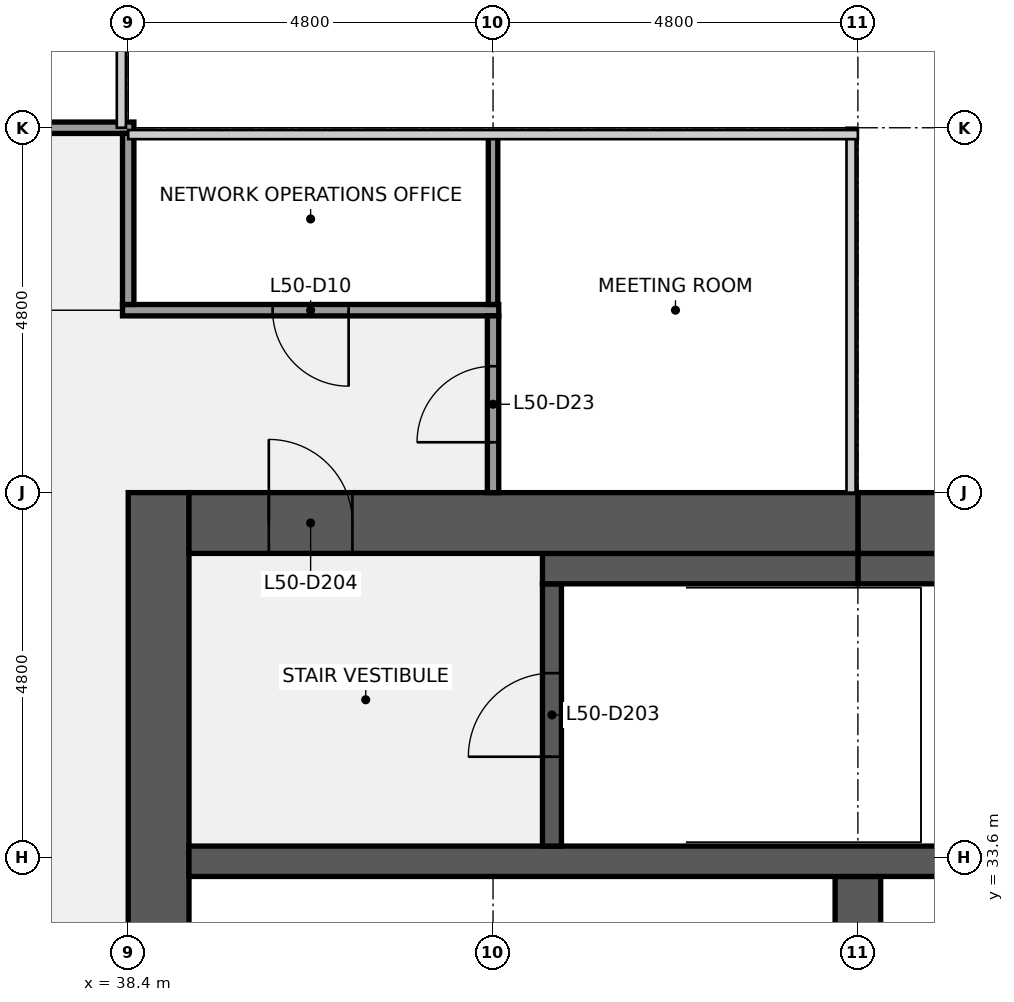
"""IFC4 building model, lengths in metres.
Left out: names, types, materials, properties, quantities, classifications, styles, units other than length and angle.
Written with IfcOpenShell. Run it as: python <this file> out.ifc"""

import sys

from ifc_helpers import new_model, si_unit, direction, frame, frame_2d, origin, place, context, subcontext, project, spatial, rectangle, extrude, element, fill, save


model = new_model("IFC4")
c1 = context("Model", 3, precision=1e-05, world=origin(), true_north=direction((0.0, 1.0)))
c2 = subcontext(c1, "Body", "Model", "MODEL_VIEW")
j1 = project(units=[si_unit("LENGTHUNIT", "METRE"), si_unit("PLANEANGLEUNIT", "RADIAN")], contexts=[c1])
p1 = place(None, origin())
s1 = spatial("IfcSite", under=j1, at=p1, CompositionType="ELEMENT")
p2 = place(p1, origin())
s2 = spatial("IfcBuilding", under=s1, at=p2, CompositionType="ELEMENT")
p3 = place(p2, frame((0.0, 0.0, 229.2)))
s3 = spatial("IfcBuildingStorey", under=s2, at=p3, CompositionType="ELEMENT", Elevation=229.2)
p4 = place(p3, frame((38.8, 9.6, 0.0), z_axis=(0.0, 0.0, 1.0), x_axis=(0.0, 1.0, 0.0)))
e1 = element("IfcWall", 1, at=p4, inside=s3, PredefinedType="SHEAR", context=c2, shape_type="SweptSolid", body=[
    extrude(rectangle(XDim=28.8, YDim=0.8, at=frame_2d((14.4, 0.0))), origin(), (0.0, 0.0, 1.0), 3.84),
])
p5 = place(p4, frame((8.7, 0.0, 0.0)))
e2 = element("IfcOpeningElement", 2, at=p5, cuts=e1, PredefinedType="OPENING", context=c2, shape_type="SweptSolid", body=[
    extrude(rectangle(XDim=1.8, YDim=2.1, at=frame_2d((0.9, 1.05))), frame((0.0, 0.41, 0.0), z_axis=(0.0, -1.0, 0.0), x_axis=(1.0, 0.0, 0.0)), (0.0, 0.0, 1.0), 0.82),
])
p6 = place(p4, frame((18.3, 0.0, 0.0)))
e3 = element("IfcOpeningElement", 3, at=p6, cuts=e1, PredefinedType="OPENING", context=c2, shape_type="SweptSolid", body=[
    extrude(rectangle(XDim=1.8, YDim=2.1, at=frame_2d((0.9, 1.05))), frame((0.0, 0.41, 0.0), z_axis=(0.0, -1.0, 0.0), x_axis=(1.0, 0.0, 0.0)), (0.0, 0.0, 1.0), 0.82),
])
p7 = place(p3, frame((48.0, 30.75, 0.0), z_axis=(0.0, 0.0, 1.0), x_axis=(0.0, 1.0, 0.0)))
e4 = element("IfcWall", 4, at=p7, inside=s3, PredefinedType="SHEAR", context=c2, shape_type="SweptSolid", body=[
    extrude(rectangle(XDim=2.6, YDim=0.6, at=frame_2d((1.3, 0.0))), origin(), (0.0, 0.0, 1.0), 3.84),
])
p8 = place(p3, frame((39.2, 33.55, 0.0), z_axis=(0.0, 0.0, 1.0), x_axis=(1.0, 0.0, 0.0)))
e5 = element("IfcWall", 5, at=p8, inside=s3, PredefinedType="SHEAR", context=c2, shape_type="SweptSolid", body=[
    extrude(rectangle(XDim=17.6, YDim=0.4, at=frame_2d((8.8, 0.0))), origin(), (0.0, 0.0, 1.0), 3.84),
])
p9 = place(p3, frame((43.975, 33.75, 0.0), z_axis=(0.0, 0.0, 1.0), x_axis=(0.0, 1.0, 0.0)))
e6 = element("IfcWall", 6, at=p9, inside=s3, PredefinedType="SHEAR", context=c2, shape_type="SweptSolid", body=[
    extrude(rectangle(XDim=3.45, YDim=0.25, at=frame_2d((1.725, 0.0))), origin(), (0.0, 0.0, 1.0), 3.84),
])
p10 = place(p9, frame((1.175, 0.0, 0.0)))
e7 = element("IfcOpeningElement", 7, at=p10, cuts=e6, PredefinedType="OPENING", context=c2, shape_type="SweptSolid", body=[
    extrude(rectangle(XDim=1.1, YDim=2.1, at=frame_2d((0.55, 1.05))), frame((0.0, 0.135, 0.0), z_axis=(0.0, -1.0, 0.0), x_axis=(1.0, 0.0, 0.0)), (0.0, 0.0, 1.0), 0.27),
])
p11 = place(p3, frame((48.0, 37.4, 0.0), z_axis=(0.0, 0.0, 1.0), x_axis=(1.0, 0.0, 0.0)))
e8 = element("IfcWall", 8, at=p11, inside=s3, PredefinedType="SHEAR", context=c2, shape_type="SweptSolid", body=[
    extrude(rectangle(XDim=3.35, YDim=0.4, at=frame_2d((1.675, 0.0))), origin(), (0.0, 0.0, 1.0), 3.84),
])
p12 = place(p3, frame((43.85, 37.4, 0.0), z_axis=(0.0, 0.0, 1.0), x_axis=(1.0, 0.0, 0.0)))
e9 = element("IfcWall", 9, at=p12, inside=s3, PredefinedType="SHEAR", context=c2, shape_type="SweptSolid", body=[
    extrude(rectangle(XDim=4.15, YDim=0.4, at=frame_2d((2.075, 0.0))), origin(), (0.0, 0.0, 1.0), 3.84),
])
p13 = place(p3, frame((48.0, 38.0, 0.0), z_axis=(0.0, 0.0, 1.0), x_axis=(1.0, 0.0, 0.0)))
e10 = element("IfcWall", 10, at=p13, inside=s3, PredefinedType="SHEAR", context=c2, shape_type="SweptSolid", body=[
    extrude(rectangle(XDim=8.8, YDim=0.8, at=frame_2d((4.4, 0.0))), origin(), (0.0, 0.0, 1.0), 3.84),
])
p14 = place(p13, frame((1.5, 0.0, 0.9)))
e11 = element("IfcOpeningElement", 11, at=p14, cuts=e10, PredefinedType="OPENING", context=c2, shape_type="SweptSolid", body=[
    extrude(rectangle(XDim=1.8, YDim=1.5, at=frame_2d((0.9, 0.75))), frame((0.0, 0.41, 0.0), z_axis=(0.0, -1.0, 0.0), x_axis=(1.0, 0.0, 0.0)), (0.0, 0.0, 1.0), 0.82),
])
p15 = place(p3, frame((39.2, 38.0, 0.0), z_axis=(0.0, 0.0, 1.0), x_axis=(1.0, 0.0, 0.0)))
e12 = element("IfcWall", 12, at=p15, inside=s3, PredefinedType="SHEAR", context=c2, shape_type="SweptSolid", body=[
    extrude(rectangle(XDim=8.8, YDim=0.8, at=frame_2d((4.4, 0.0))), origin(), (0.0, 0.0, 1.0), 3.84),
])
p16 = place(p15, frame((1.05, 0.0, 0.0)))
e13 = element("IfcOpeningElement", 13, at=p16, cuts=e12, PredefinedType="OPENING", context=c2, shape_type="SweptSolid", body=[
    extrude(rectangle(XDim=1.1, YDim=2.1, at=frame_2d((0.55, 1.05))), frame((0.0, 0.41, 0.0), z_axis=(0.0, -1.0, 0.0), x_axis=(1.0, 0.0, 0.0)), (0.0, 0.0, 1.0), 0.82),
])
p17 = place(p3, frame((38.325, 40.8, 0.0), z_axis=(0.0, 0.0, 1.0), x_axis=(1.0, 0.0, 0.0)))
e14 = element("IfcWall", 14, at=p17, inside=s3, PredefinedType="PARTITIONING", context=c2, shape_type="SweptSolid", body=[
    extrude(rectangle(XDim=4.95, YDim=0.15, at=frame_2d((2.475, 0.0))), origin(), (0.0, 0.0, 1.0), 2.849),
])
p18 = place(p17, frame((1.975, 0.0, 0.0)))
e15 = element("IfcOpeningElement", 15, at=p18, cuts=e14, PredefinedType="OPENING", context=c2, shape_type="SweptSolid", body=[
    extrude(rectangle(XDim=1.0, YDim=2.1, at=frame_2d((0.5, 1.05))), frame((0.0, 0.085, 0.0), z_axis=(0.0, -1.0, 0.0), x_axis=(1.0, 0.0, 0.0)), (0.0, 0.0, 1.0), 0.17),
])
p19 = place(p3, frame((19.125, 43.2, 0.0), z_axis=(0.0, 0.0, 1.0), x_axis=(1.0, 0.0, 0.0)))
e16 = element("IfcWall", 16, at=p19, inside=s3, PredefinedType="PARTITIONING", context=c2, shape_type="SweptSolid", body=[
    extrude(rectangle(XDim=19.35, YDim=0.15, at=frame_2d((9.675, 0.0))), origin(), (0.0, 0.0, 1.0), 2.849),
])
p20 = place(p19, frame((4.375, 0.0, 0.0)))
e17 = element("IfcOpeningElement", 17, at=p20, cuts=e16, PredefinedType="OPENING", context=c2, shape_type="SweptSolid", body=[
    extrude(rectangle(XDim=1.0, YDim=2.1, at=frame_2d((0.5, 1.05))), frame((0.0, 0.085, 0.0), z_axis=(0.0, -1.0, 0.0), x_axis=(1.0, 0.0, 0.0)), (0.0, 0.0, 1.0), 0.17),
])
p21 = place(p19, frame((13.975, 0.0, 0.0)))
e18 = element("IfcOpeningElement", 18, at=p21, cuts=e16, PredefinedType="OPENING", context=c2, shape_type="SweptSolid", body=[
    extrude(rectangle(XDim=1.0, YDim=2.1, at=frame_2d((0.5, 1.05))), frame((0.0, 0.085, 0.0), z_axis=(0.0, -1.0, 0.0), x_axis=(1.0, 0.0, 0.0)), (0.0, 0.0, 1.0), 0.17),
])
p22 = place(p3, frame((38.4, 40.875, 0.0), z_axis=(0.0, 0.0, 1.0), x_axis=(0.0, 1.0, 0.0)))
e19 = element("IfcWall", 19, at=p22, inside=s3, PredefinedType="PARTITIONING", context=c2, shape_type="SweptSolid", body=[
    extrude(rectangle(XDim=2.25, YDim=0.15, at=frame_2d((1.125, 0.0))), origin(), (0.0, 0.0, 1.0), 2.849),
])
p23 = place(p3, frame((43.2, 40.875, 0.0), z_axis=(0.0, 0.0, 1.0), x_axis=(0.0, 1.0, 0.0)))
e20 = element("IfcWall", 20, at=p23, inside=s3, PredefinedType="PARTITIONING", context=c2, shape_type="SweptSolid", body=[
    extrude(rectangle(XDim=2.225, YDim=0.125, at=frame_2d((1.113, 0.0))), origin(), (0.0, 0.0, 1.0), 2.849),
])
p24 = place(p3, frame((43.2, 38.4, 0.0), z_axis=(0.0, 0.0, 1.0), x_axis=(0.0, 1.0, 0.0)))
e21 = element("IfcWall", 21, at=p24, inside=s3, PredefinedType="PARTITIONING", context=c2, shape_type="SweptSolid", body=[
    extrude(rectangle(XDim=2.325, YDim=0.15, at=frame_2d((1.163, 0.0))), origin(), (0.0, 0.0, 1.0), 2.849),
])
p25 = place(p24, frame((0.663, 0.0, 0.0)))
e22 = element("IfcOpeningElement", 22, at=p25, cuts=e21, PredefinedType="OPENING", context=c2, shape_type="SweptSolid", body=[
    extrude(rectangle(XDim=1.0, YDim=2.1, at=frame_2d((0.5, 1.05))), frame((0.0, 0.085, 0.0), z_axis=(0.0, -1.0, 0.0), x_axis=(1.0, 0.0, 0.0)), (0.0, 0.0, 1.0), 0.17),
])
p26 = place(p10, origin())
e23 = element("IfcDoor", 23, at=p26, inside=s3, OperationType="SINGLE_SWING_LEFT", PredefinedType="DOOR", context=c2, shape_type="SweptSolid", body=[
    extrude(rectangle(XDim=1.1, YDim=2.1, at=frame_2d((0.55, 1.05))), frame((0.0, 0.025, 0.0), z_axis=(0.0, -1.0, 0.0), x_axis=(1.0, 0.0, 0.0)), (0.0, 0.0, 1.0), 0.05),
])
fill(e7, e23)
p27 = place(p16, origin())
e24 = element("IfcDoor", 24, at=p27, inside=s3, OperationType="SINGLE_SWING_LEFT", PredefinedType="DOOR", context=c2, shape_type="SweptSolid", body=[
    extrude(rectangle(XDim=1.1, YDim=2.1, at=frame_2d((0.55, 1.05))), frame((0.0, 0.025, 0.0), z_axis=(0.0, -1.0, 0.0), x_axis=(1.0, 0.0, 0.0)), (0.0, 0.0, 1.0), 0.05),
])
fill(e13, e24)
p28 = place(p18, origin())
e25 = element("IfcDoor", 25, at=p28, inside=s3, OperationType="SINGLE_SWING_RIGHT", PredefinedType="DOOR", context=c2, shape_type="SweptSolid", body=[
    extrude(rectangle(XDim=1.0, YDim=2.1, at=frame_2d((0.5, 1.05))), frame((0.0, 0.025, 0.0), z_axis=(0.0, -1.0, 0.0), x_axis=(1.0, 0.0, 0.0)), (0.0, 0.0, 1.0), 0.05),
])
fill(e15, e25)
p29 = place(p25, origin())
e26 = element("IfcDoor", 26, at=p29, inside=s3, OperationType="SINGLE_SWING_LEFT", PredefinedType="DOOR", context=c2, shape_type="SweptSolid", body=[
    extrude(rectangle(XDim=1.0, YDim=2.1, at=frame_2d((0.5, 1.05))), frame((0.0, 0.025, 0.0), z_axis=(0.0, -1.0, 0.0), x_axis=(1.0, 0.0, 0.0)), (0.0, 0.0, 1.0), 0.05),
])
fill(e22, e26)
save(model, sys.argv[1])
